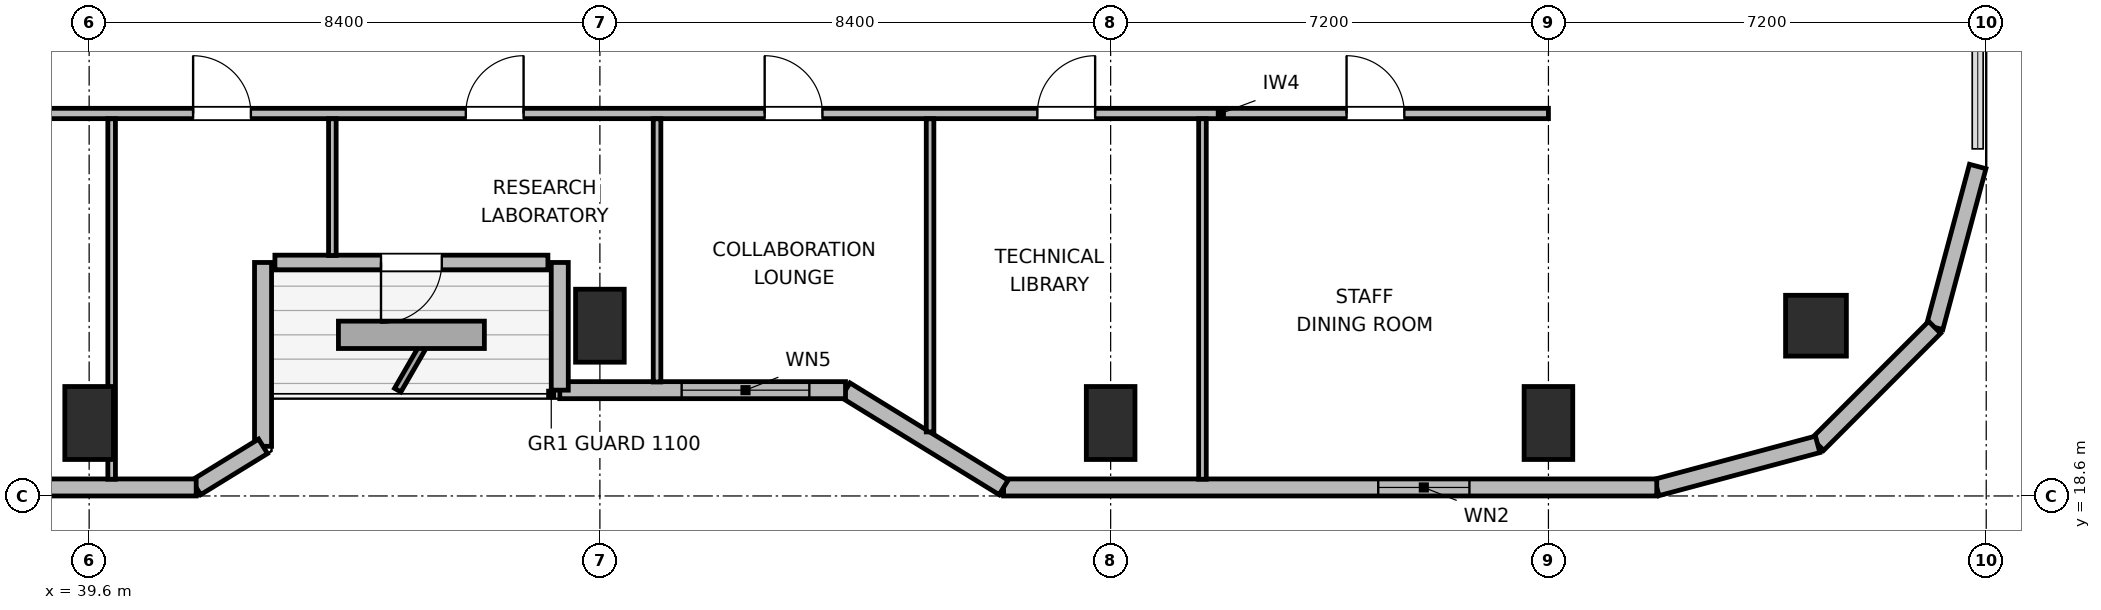
"""IFC4 building model, lengths in metres.
Left out: names, types, materials, properties, quantities, classifications, styles, units other than length and angle.
Written with IfcOpenShell. Run it as: python <this file> out.ifc"""

import sys

from ifc_helpers import new_model, si_unit, direction, frame, frame_2d, origin, origin_2d, place, context, subcontext, project, spatial, rectangle, circle, extrude, element, fill, save


model = new_model("IFC4")
c1 = context("Model", 3, precision=1e-05, world=origin(), true_north=direction((0.0, 1.0)))
c2 = subcontext(c1, "Body", "Model", "MODEL_VIEW")
j1 = project(units=[si_unit("LENGTHUNIT", "METRE"), si_unit("PLANEANGLEUNIT", "RADIAN")], contexts=[c1])
p1 = place(None, origin())
s1 = spatial("IfcSite", under=j1, at=p1, CompositionType="ELEMENT")
p2 = place(p1, origin())
s2 = spatial("IfcBuilding", under=s1, at=p2, CompositionType="ELEMENT")
p3 = place(p2, frame((0.0, 0.0, 166.2)))
s3 = spatial("IfcBuildingStorey", under=s2, at=p3, CompositionType="ELEMENT", Elevation=166.2)
p4 = place(p3, frame((68.0, 21.4, 0.0), z_axis=(0.0, 0.0, 1.0), x_axis=(1.0, 0.0, 0.0)))
e1 = element("IfcColumn", 1, at=p4, inside=s3, PredefinedType="COLUMN", context=c2, shape_type="SweptSolid", body=[
    extrude(circle(Radius=0.5, at=origin_2d()), origin(), (0.0, 0.0, 1.0), 3.9),
])
for number, where, z_axis, x_axis in (
    (2, (39.6, 19.8, 0.0), (0.0, 0.0, 1.0), (1.0, 0.0, 0.0)),
    (3, (48.0, 21.4, 0.0), (0.0, 0.0, 1.0), (1.0, 0.0, 0.0)),
    (4, (56.4, 19.8, 0.0), (0.0, 0.0, 1.0), (1.0, 0.0, 0.0)),
    (5, (63.6, 19.8, 0.0), (0.0, 0.0, 1.0), (1.0, 0.0, 0.0)),
):
    element("IfcColumn", number, at=place(p3, frame(where, z_axis=z_axis, x_axis=x_axis)), inside=s3, PredefinedType="COLUMN", context=c2, shape_type="SweptSolid", body=[
        extrude(rectangle(XDim=0.8, YDim=1.2, at=origin_2d()), origin(), (0.0, 0.0, 1.0), 3.9),
    ])
p5 = place(p3, frame((70.66, 24.018, 0.0), z_axis=(0.0, 0.0, 1.0), x_axis=(-0.258672222976, -0.9659651552, 0.0)))
e6 = element("IfcWall", 6, at=p5, inside=s3, PredefinedType="SOLIDWALL", context=c2, shape_type="SweptSolid", body=[
    extrude(rectangle(XDim=2.739, YDim=0.28, at=frame_2d((1.37, 0.0))), origin(), (0.0, 0.0, 1.0), 3.68),
])
p6 = place(p3, frame((69.951, 21.373, 0.0), z_axis=(0.0, 0.0, 1.0), x_axis=(-0.707061915429, -0.707151644098, 0.0)))
e7 = element("IfcWall", 7, at=p6, inside=s3, PredefinedType="SOLIDWALL", context=c2, shape_type="SweptSolid", body=[
    extrude(rectangle(XDim=2.721, YDim=0.28, at=frame_2d((1.36, 0.0))), origin(), (0.0, 0.0, 1.0), 3.68),
])
p7 = place(p3, frame((68.028, 19.448, 0.0), z_axis=(0.0, 0.0, 1.0), x_axis=(-0.965971118627, -0.258649952598, 0.0)))
e8 = element("IfcWall", 8, at=p7, inside=s3, PredefinedType="SOLIDWALL", context=c2, shape_type="SweptSolid", body=[
    extrude(rectangle(XDim=2.739, YDim=0.28, at=frame_2d((1.37, 0.0))), origin(), (0.0, 0.0, 1.0), 3.68),
])
p8 = place(p3, frame((65.382, 18.74, 0.0), z_axis=(0.0, 0.0, 1.0), x_axis=(-1.0, 0.0, 0.0)))
e9 = element("IfcWall", 9, at=p8, inside=s3, PredefinedType="SOLIDWALL", context=c2, shape_type="SweptSolid", body=[
    extrude(rectangle(XDim=10.742, YDim=0.28, at=frame_2d((5.371, 0.0))), origin(), (0.0, 0.0, 1.0), 3.68),
])
p9 = place(p8, frame((3.081, 0.0, 0.85)))
e10 = element("IfcOpeningElement", 10, at=p9, cuts=e9, PredefinedType="OPENING", context=c2, shape_type="SweptSolid", body=[
    extrude(rectangle(XDim=1.5, YDim=1.1, at=frame_2d((0.75, 0.55))), frame((0.0, 0.15, 0.0), z_axis=(0.0, -1.0, 0.0), x_axis=(1.0, 0.0, 0.0)), (0.0, 0.0, 1.0), 0.3),
])
p10 = place(p3, frame((54.64, 18.74, 0.0), z_axis=(0.0, 0.0, 1.0), x_axis=(-0.851652825334, 0.524106349037, 0.0)))
e11 = element("IfcWall", 11, at=p10, inside=s3, PredefinedType="SOLIDWALL", context=c2, shape_type="SweptSolid", body=[
    extrude(rectangle(XDim=3.053, YDim=0.28, at=frame_2d((1.526, 0.0))), origin(), (0.0, 0.0, 1.0), 2.265),
])
p11 = place(p3, frame((52.04, 20.34, 0.0), z_axis=(0.0, 0.0, 1.0), x_axis=(-1.0, 0.0, 0.0)))
e12 = element("IfcWall", 12, at=p11, inside=s3, PredefinedType="SOLIDWALL", context=c2, shape_type="SweptSolid", body=[
    extrude(rectangle(XDim=4.699, YDim=0.28, at=frame_2d((2.35, 0.0))), origin(), (0.0, 0.0, 1.0), 2.265),
])
p12 = place(p11, frame((0.595, 0.0, 0.85)))
e13 = element("IfcOpeningElement", 13, at=p12, cuts=e12, PredefinedType="OPENING", context=c2, shape_type="SweptSolid", body=[
    extrude(rectangle(XDim=2.1, YDim=1.05, at=frame_2d((1.05, 0.525))), frame((0.0, 0.15, 0.0), z_axis=(0.0, -1.0, 0.0), x_axis=(1.0, 0.0, 0.0)), (0.0, 0.0, 1.0), 0.3),
])
p13 = place(p3, frame((47.34, 20.34, 0.0), z_axis=(0.0, 0.0, 1.0), x_axis=(0.0, 1.0, 0.0)))
e14 = element("IfcWall", 14, at=p13, inside=s3, PredefinedType="SOLIDWALL", context=c2, shape_type="SweptSolid", body=[
    extrude(rectangle(XDim=2.1, YDim=0.28, at=frame_2d((1.05, 0.0))), origin(), (0.0, 0.0, 1.0), 2.265),
])
p14 = place(p3, frame((47.145, 22.44, 0.0), z_axis=(0.0, 0.0, 1.0), x_axis=(-1.0, 0.0, 0.0)))
e15 = element("IfcWall", 15, at=p14, inside=s3, PredefinedType="SOLIDWALL", context=c2, shape_type="SweptSolid", body=[
    extrude(rectangle(XDim=4.49, YDim=0.24, at=frame_2d((2.245, 0.0))), origin(), (0.0, 0.0, 1.0), 3.68),
])
p15 = place(p14, frame((1.745, 0.0, 0.0)))
e16 = element("IfcOpeningElement", 16, at=p15, cuts=e15, PredefinedType="OPENING", context=c2, shape_type="SweptSolid", body=[
    extrude(rectangle(XDim=1.0, YDim=2.02, at=frame_2d((0.5, 1.01))), frame((0.0, 0.13, 0.0), z_axis=(0.0, -1.0, 0.0), x_axis=(1.0, 0.0, 0.0)), (0.0, 0.0, 1.0), 0.26),
])
p16 = place(p3, frame((42.46, 22.44, 0.0), z_axis=(0.0, 0.0, 1.0), x_axis=(0.0, -1.0, 0.0)))
e17 = element("IfcWall", 17, at=p16, inside=s3, PredefinedType="SOLIDWALL", context=c2, shape_type="SweptSolid", body=[
    extrude(rectangle(XDim=3.024, YDim=0.28, at=frame_2d((1.512, 0.0))), origin(), (0.0, 0.0, 1.0), 2.265),
])
p17 = place(p3, frame((42.46, 19.416, 0.0), z_axis=(0.0, 0.0, 1.0), x_axis=(-0.851801140441, -0.523865266212, 0.0)))
e18 = element("IfcWall", 18, at=p17, inside=s3, PredefinedType="SOLIDWALL", context=c2, shape_type="SweptSolid", body=[
    extrude(rectangle(XDim=1.291, YDim=0.28, at=frame_2d((0.646, 0.0))), origin(), (0.0, 0.0, 1.0), 3.68),
])
p18 = place(p3, frame((41.36, 18.74, 0.0), z_axis=(0.0, 0.0, 1.0), x_axis=(-1.0, 0.0, 0.0)))
e19 = element("IfcWall", 19, at=p18, inside=s3, PredefinedType="SOLIDWALL", context=c2, shape_type="SweptSolid", body=[
    extrude(rectangle(XDim=17.942, YDim=0.28, at=frame_2d((8.971, 0.0))), origin(), (0.0, 0.0, 1.0), 3.68),
])
p19 = place(p3, frame((29.8, 24.89, 0.0), z_axis=(0.0, 0.0, 1.0), x_axis=(1.0, 0.0, 0.0)))
e20 = element("IfcWall", 20, at=p19, inside=s3, PredefinedType="PARTITIONING", context=c2, shape_type="SweptSolid", body=[
    extrude(rectangle(XDim=33.8, YDim=0.17, at=frame_2d((16.9, 0.0))), origin(), (0.0, 0.0, 1.0), 3.68),
])
p20 = place(p19, frame((2.37, 0.0, 0.0)))
e21 = element("IfcOpeningElement", 21, at=p20, cuts=e20, PredefinedType="OPENING", context=c2, shape_type="SweptSolid", body=[
    extrude(rectangle(XDim=0.95, YDim=2.04, at=frame_2d((0.475, 1.02))), frame((0.0, 0.095, 0.0), z_axis=(0.0, -1.0, 0.0), x_axis=(1.0, 0.0, 0.0)), (0.0, 0.0, 1.0), 0.19),
])
p21 = place(p19, frame((7.455, 0.0, 0.0)))
e22 = element("IfcOpeningElement", 22, at=p21, cuts=e20, PredefinedType="OPENING", context=c2, shape_type="SweptSolid", body=[
    extrude(rectangle(XDim=0.95, YDim=2.04, at=frame_2d((0.475, 1.02))), frame((0.0, 0.095, 0.0), z_axis=(0.0, -1.0, 0.0), x_axis=(1.0, 0.0, 0.0)), (0.0, 0.0, 1.0), 0.19),
])
p22 = place(p19, frame((11.51, 0.0, 0.0)))
e23 = element("IfcOpeningElement", 23, at=p22, cuts=e20, PredefinedType="OPENING", context=c2, shape_type="SweptSolid", body=[
    extrude(rectangle(XDim=0.95, YDim=2.04, at=frame_2d((0.475, 1.02))), frame((0.0, 0.095, 0.0), z_axis=(0.0, -1.0, 0.0), x_axis=(1.0, 0.0, 0.0)), (0.0, 0.0, 1.0), 0.19),
])
p23 = place(p19, frame((15.995, 0.0, 0.0)))
e24 = element("IfcOpeningElement", 24, at=p23, cuts=e20, PredefinedType="OPENING", context=c2, shape_type="SweptSolid", body=[
    extrude(rectangle(XDim=0.95, YDim=2.04, at=frame_2d((0.475, 1.02))), frame((0.0, 0.095, 0.0), z_axis=(0.0, -1.0, 0.0), x_axis=(1.0, 0.0, 0.0)), (0.0, 0.0, 1.0), 0.19),
])
p24 = place(p19, frame((20.91, 0.0, 0.0)))
e25 = element("IfcOpeningElement", 25, at=p24, cuts=e20, PredefinedType="OPENING", context=c2, shape_type="SweptSolid", body=[
    extrude(rectangle(XDim=0.95, YDim=2.04, at=frame_2d((0.475, 1.02))), frame((0.0, 0.095, 0.0), z_axis=(0.0, -1.0, 0.0), x_axis=(1.0, 0.0, 0.0)), (0.0, 0.0, 1.0), 0.19),
])
p25 = place(p19, frame((25.395, 0.0, 0.0)))
e26 = element("IfcOpeningElement", 26, at=p25, cuts=e20, PredefinedType="OPENING", context=c2, shape_type="SweptSolid", body=[
    extrude(rectangle(XDim=0.95, YDim=2.04, at=frame_2d((0.475, 1.02))), frame((0.0, 0.095, 0.0), z_axis=(0.0, -1.0, 0.0), x_axis=(1.0, 0.0, 0.0)), (0.0, 0.0, 1.0), 0.19),
])
p26 = place(p19, frame((30.48, 0.0, 0.0)))
e27 = element("IfcOpeningElement", 27, at=p26, cuts=e20, PredefinedType="OPENING", context=c2, shape_type="SweptSolid", body=[
    extrude(rectangle(XDim=0.95, YDim=2.04, at=frame_2d((0.475, 1.02))), frame((0.0, 0.095, 0.0), z_axis=(0.0, -1.0, 0.0), x_axis=(1.0, 0.0, 0.0)), (0.0, 0.0, 1.0), 0.19),
])
p27 = place(p3, frame((39.97, 18.875, 0.0), z_axis=(0.0, 0.0, 1.0), x_axis=(0.0, 1.0, 0.0)))
e28 = element("IfcWall", 28, at=p27, inside=s3, PredefinedType="PARTITIONING", context=c2, shape_type="SweptSolid", body=[
    extrude(rectangle(XDim=5.928, YDim=0.125, at=frame_2d((2.964, 0.0))), origin(), (0.0, 0.0, 1.0), 3.043),
])
p28 = place(p3, frame((43.6, 22.555, 0.0), z_axis=(0.0, 0.0, 1.0), x_axis=(0.0, 1.0, 0.0)))
e29 = element("IfcWall", 29, at=p28, inside=s3, PredefinedType="PARTITIONING", context=c2, shape_type="SweptSolid", body=[
    extrude(rectangle(XDim=2.248, YDim=0.125, at=frame_2d((1.124, 0.0))), origin(), (0.0, 0.0, 1.0), 3.043),
])
p29 = place(p3, frame((48.94, 20.475, 0.0), z_axis=(0.0, 0.0, 1.0), x_axis=(0.0, 1.0, 0.0)))
e30 = element("IfcWall", 30, at=p29, inside=s3, PredefinedType="PARTITIONING", context=c2, shape_type="SweptSolid", body=[
    extrude(rectangle(XDim=4.328, YDim=0.125, at=frame_2d((2.164, 0.0))), origin(), (0.0, 0.0, 1.0), 3.68),
])
p30 = place(p3, frame((53.43, 19.653, 0.0), z_axis=(0.0, 0.0, 1.0), x_axis=(0.0, 1.0, 0.0)))
e31 = element("IfcWall", 31, at=p30, inside=s3, PredefinedType="PARTITIONING", context=c2, shape_type="SweptSolid", body=[
    extrude(rectangle(XDim=5.15, YDim=0.125, at=frame_2d((2.575, 0.0))), origin(), (0.0, 0.0, 1.0), 3.043),
])
p31 = place(p3, frame((57.91, 18.875, 0.0), z_axis=(0.0, 0.0, 1.0), x_axis=(0.0, 1.0, 0.0)))
e32 = element("IfcWall", 32, at=p31, inside=s3, PredefinedType="PARTITIONING", context=c2, shape_type="SweptSolid", body=[
    extrude(rectangle(XDim=5.928, YDim=0.125, at=frame_2d((2.964, 0.0))), origin(), (0.0, 0.0, 1.0), 3.68),
])
p32 = place(p9, origin())
e33 = element("IfcWindow", 33, at=p32, inside=s3, PartitioningType="SINGLE_PANEL", PredefinedType="WINDOW", context=c2, shape_type="SweptSolid", body=[
    extrude(rectangle(XDim=1.5, YDim=1.1, at=frame_2d((0.75, 0.55))), frame((0.0, 0.03, 0.0), z_axis=(0.0, -1.0, 0.0), x_axis=(1.0, 0.0, 0.0)), (0.0, 0.0, 1.0), 0.06),
])
fill(e10, e33)
p33 = place(p12, origin())
e34 = element("IfcWindow", 34, at=p33, inside=s3, PartitioningType="SINGLE_PANEL", PredefinedType="WINDOW", context=c2, shape_type="SweptSolid", body=[
    extrude(rectangle(XDim=2.1, YDim=1.05, at=frame_2d((1.05, 0.525))), frame((0.0, 0.03, 0.0), z_axis=(0.0, -1.0, 0.0), x_axis=(1.0, 0.0, 0.0)), (0.0, 0.0, 1.0), 0.06),
])
fill(e13, e34)
p34 = place(p15, origin())
e35 = element("IfcDoor", 35, at=p34, inside=s3, OperationType="SINGLE_SWING_RIGHT", PredefinedType="DOOR", context=c2, shape_type="SweptSolid", body=[
    extrude(rectangle(XDim=1.0, YDim=2.02, at=frame_2d((0.5, 1.01))), frame((0.0, 0.025, 0.0), z_axis=(0.0, -1.0, 0.0), x_axis=(1.0, 0.0, 0.0)), (0.0, 0.0, 1.0), 0.05),
])
fill(e16, e35)
p35 = place(p22, origin())
e36 = element("IfcDoor", 36, at=p35, inside=s3, OperationType="SINGLE_SWING_LEFT", PredefinedType="DOOR", context=c2, shape_type="SweptSolid", body=[
    extrude(rectangle(XDim=0.95, YDim=2.04, at=frame_2d((0.475, 1.02))), frame((0.0, 0.025, 0.0), z_axis=(0.0, -1.0, 0.0), x_axis=(1.0, 0.0, 0.0)), (0.0, 0.0, 1.0), 0.05),
])
fill(e23, e36)
p36 = place(p23, origin())
e37 = element("IfcDoor", 37, at=p36, inside=s3, OperationType="SINGLE_SWING_RIGHT", PredefinedType="DOOR", context=c2, shape_type="SweptSolid", body=[
    extrude(rectangle(XDim=0.95, YDim=2.04, at=frame_2d((0.475, 1.02))), frame((0.0, 0.025, 0.0), z_axis=(0.0, -1.0, 0.0), x_axis=(1.0, 0.0, 0.0)), (0.0, 0.0, 1.0), 0.05),
])
fill(e24, e37)
p37 = place(p24, origin())
e38 = element("IfcDoor", 38, at=p37, inside=s3, OperationType="SINGLE_SWING_LEFT", PredefinedType="DOOR", context=c2, shape_type="SweptSolid", body=[
    extrude(rectangle(XDim=0.95, YDim=2.04, at=frame_2d((0.475, 1.02))), frame((0.0, 0.025, 0.0), z_axis=(0.0, -1.0, 0.0), x_axis=(1.0, 0.0, 0.0)), (0.0, 0.0, 1.0), 0.05),
])
fill(e25, e38)
p38 = place(p25, origin())
e39 = element("IfcDoor", 39, at=p38, inside=s3, OperationType="SINGLE_SWING_RIGHT", PredefinedType="DOOR", context=c2, shape_type="SweptSolid", body=[
    extrude(rectangle(XDim=0.95, YDim=2.04, at=frame_2d((0.475, 1.02))), frame((0.0, 0.025, 0.0), z_axis=(0.0, -1.0, 0.0), x_axis=(1.0, 0.0, 0.0)), (0.0, 0.0, 1.0), 0.05),
])
fill(e26, e39)
p39 = place(p26, origin())
e40 = element("IfcDoor", 40, at=p39, inside=s3, OperationType="SINGLE_SWING_LEFT", PredefinedType="DOOR", context=c2, shape_type="SweptSolid", body=[
    extrude(rectangle(XDim=0.95, YDim=2.04, at=frame_2d((0.475, 1.02))), frame((0.0, 0.025, 0.0), z_axis=(0.0, -1.0, 0.0), x_axis=(1.0, 0.0, 0.0)), (0.0, 0.0, 1.0), 0.05),
])
fill(e27, e40)
save(model, sys.argv[1])
